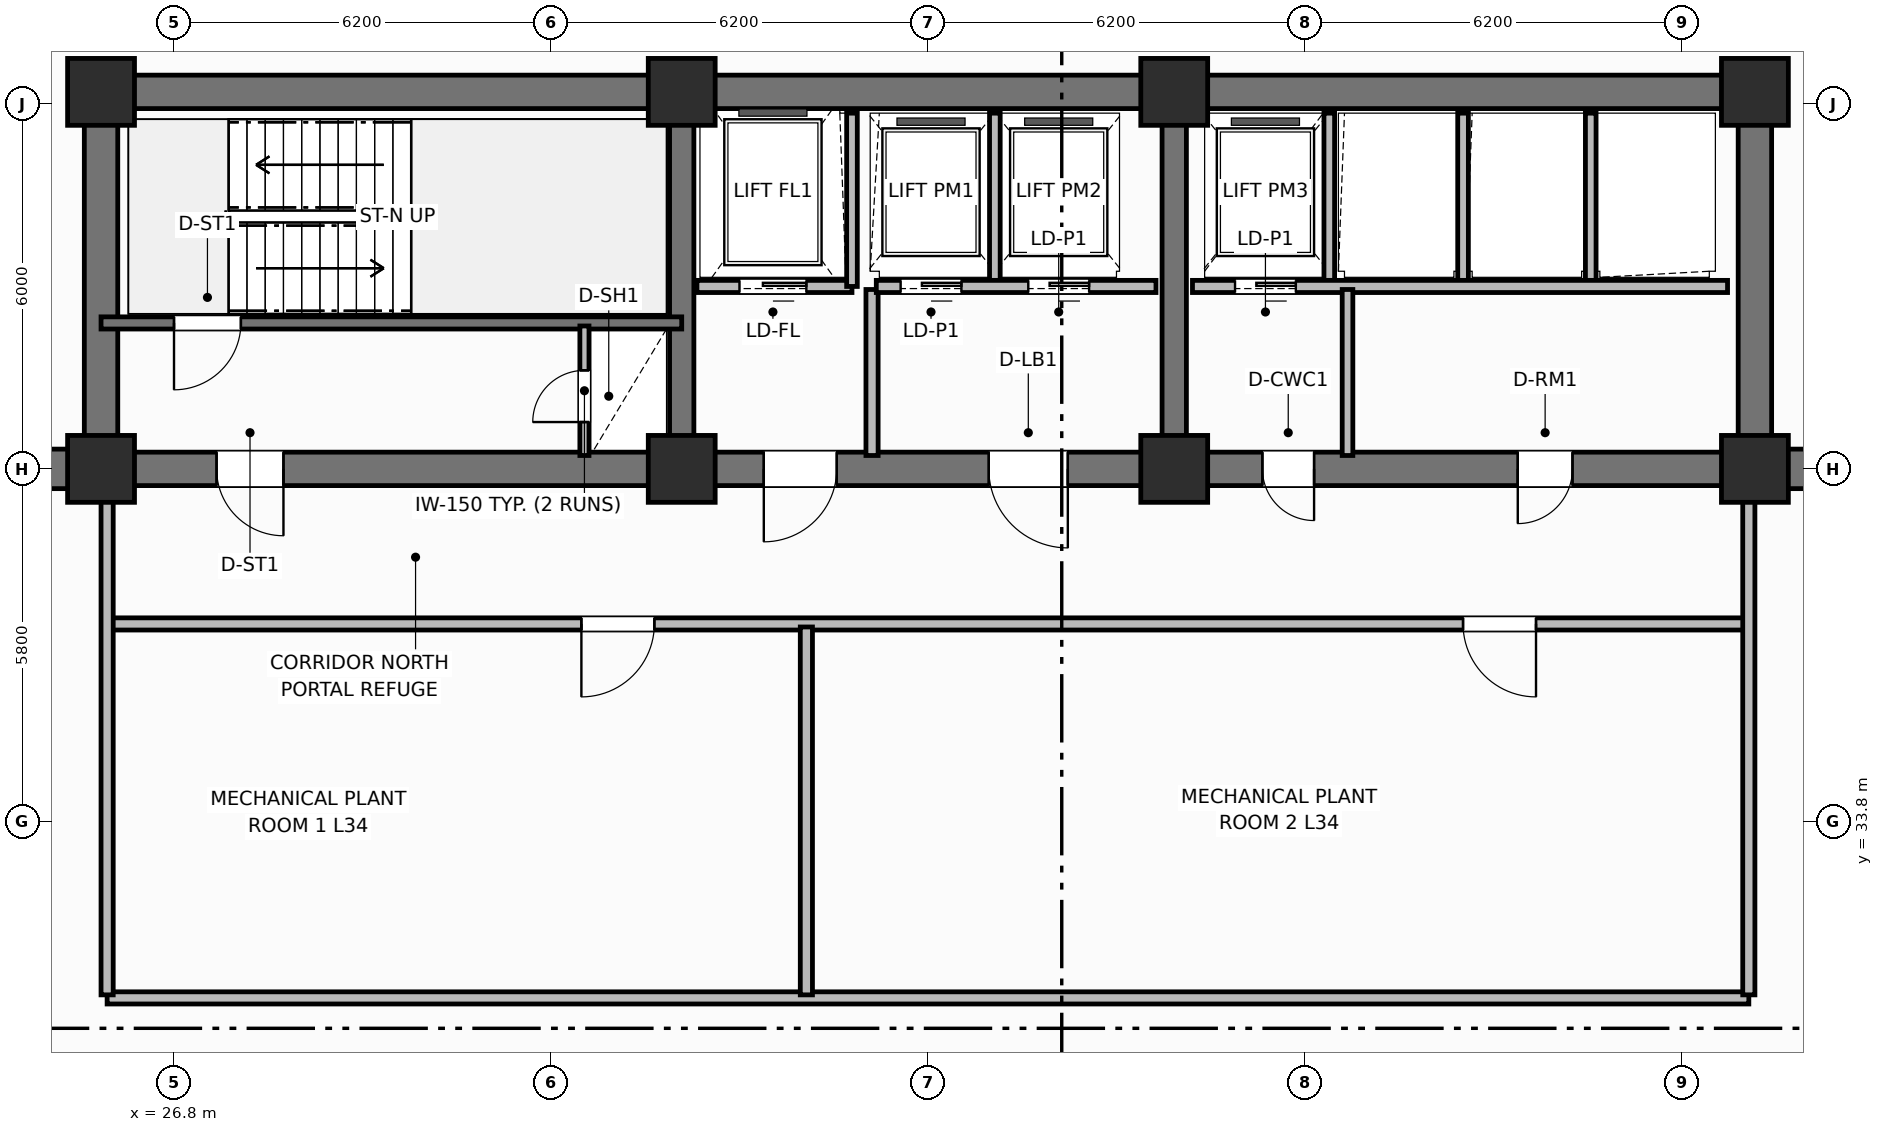
"""IFC4 building model, lengths in metres.
Left out: names, types, materials, properties, quantities, classifications, styles, units other than length and angle.
Written with IfcOpenShell. Run it as: python <this file> out.ifc"""

import sys

from ifc_helpers import new_model, si_unit, direction, frame, frame_2d, origin, origin_2d, place, context, subcontext, project, spatial, rectangle, extrude, element, fill, save


model = new_model("IFC4")
c1 = context("Model", 3, precision=1e-05, world=origin(), true_north=direction((0.0, 1.0)))
c2 = subcontext(c1, "Body", "Model", "MODEL_VIEW")
j1 = project(units=[si_unit("LENGTHUNIT", "METRE"), si_unit("PLANEANGLEUNIT", "RADIAN")], contexts=[c1])
p1 = place(None, origin())
s1 = spatial("IfcSite", under=j1, at=p1, CompositionType="ELEMENT")
p2 = place(p1, origin())
s2 = spatial("IfcBuilding", under=s1, at=p2, CompositionType="ELEMENT")
p3 = place(p2, frame((0.0, 0.0, 136.4)))
s3 = spatial("IfcBuildingStorey", under=s2, at=p3, CompositionType="ELEMENT", Elevation=136.4)
p4 = place(p3, frame((25.6, 45.8, 0.0), z_axis=(0.0, 0.0, 1.0), x_axis=(1.0, 0.0, 0.0)))
e1 = element("IfcWall", 1, at=p4, inside=s3, PredefinedType="SHEAR", context=c2, shape_type="SweptSolid", body=[
    extrude(rectangle(XDim=27.2, YDim=0.55, at=frame_2d((13.6, 0.0))), origin(), (0.0, 0.0, 1.0), 7.2),
])
for number, where, z_axis, x_axis in (
    (2, (25.6, 39.875, 0.0), (0.0, 0.0, 1.0), (0.0, 1.0, 0.0)),
    (3, (52.8, 39.875, 0.0), (0.0, 0.0, 1.0), (0.0, 1.0, 0.0)),
):
    element("IfcWall", number, at=place(p3, frame(where, z_axis=z_axis, x_axis=x_axis)), inside=s3, PredefinedType="SHEAR", context=c2, shape_type="SweptSolid", body=[
        extrude(rectangle(XDim=5.65, YDim=0.55, at=frame_2d((2.825, 0.0))), origin(), (0.0, 0.0, 1.0), 7.2),
    ])
p5 = place(p3, frame((52.8, 39.6, 0.0), z_axis=(0.0, 0.0, 1.0), x_axis=(-1.0, 0.0, 0.0)))
e4 = element("IfcWall", 4, at=p5, inside=s3, PredefinedType="SHEAR", context=c2, shape_type="SweptSolid", body=[
    extrude(rectangle(XDim=27.2, YDim=0.55, at=frame_2d((13.6, 0.0))), origin(), (0.0, 0.0, 1.0), 7.2),
])
p6 = place(p5, frame((24.2, 0.0, 0.0)))
e5 = element("IfcOpeningElement", 5, at=p6, cuts=e4, PredefinedType="OPENING", context=c2, shape_type="SweptSolid", body=[
    extrude(rectangle(XDim=1.1, YDim=2.15, at=frame_2d((0.55, 1.075))), frame((0.0, 0.285, 0.0), z_axis=(0.0, -1.0, 0.0), x_axis=(1.0, 0.0, 0.0)), (0.0, 0.0, 1.0), 0.57),
])
p7 = place(p5, frame((15.1, 0.0, 0.0)))
e6 = element("IfcOpeningElement", 6, at=p7, cuts=e4, PredefinedType="OPENING", context=c2, shape_type="SweptSolid", body=[
    extrude(rectangle(XDim=1.2, YDim=2.15, at=frame_2d((0.6, 1.075))), frame((0.0, 0.285, 0.0), z_axis=(0.0, -1.0, 0.0), x_axis=(1.0, 0.0, 0.0)), (0.0, 0.0, 1.0), 0.57),
])
p8 = place(p5, frame((11.3, 0.0, 0.0)))
e7 = element("IfcOpeningElement", 7, at=p8, cuts=e4, PredefinedType="OPENING", context=c2, shape_type="SweptSolid", body=[
    extrude(rectangle(XDim=1.3, YDim=2.2, at=frame_2d((0.65, 1.1))), frame((0.0, 0.285, 0.0), z_axis=(0.0, -1.0, 0.0), x_axis=(1.0, 0.0, 0.0)), (0.0, 0.0, 1.0), 0.57),
])
p9 = place(p5, frame((7.25, 0.0, 0.0)))
e8 = element("IfcOpeningElement", 8, at=p9, cuts=e4, PredefinedType="OPENING", context=c2, shape_type="SweptSolid", body=[
    extrude(rectangle(XDim=0.85, YDim=2.1, at=frame_2d((0.425, 1.05))), frame((0.0, 0.285, 0.0), z_axis=(0.0, -1.0, 0.0), x_axis=(1.0, 0.0, 0.0)), (0.0, 0.0, 1.0), 0.57),
])
p10 = place(p5, frame((3.0, 0.0, 0.0)))
e9 = element("IfcOpeningElement", 9, at=p10, cuts=e4, PredefinedType="OPENING", context=c2, shape_type="SweptSolid", body=[
    extrude(rectangle(XDim=0.9, YDim=2.1, at=frame_2d((0.45, 1.05))), frame((0.0, 0.285, 0.0), z_axis=(0.0, -1.0, 0.0), x_axis=(1.0, 0.0, 0.0)), (0.0, 0.0, 1.0), 0.57),
])
for number, where, z_axis, x_axis in (
    (10, (35.15, 39.875, 0.0), (0.0, 0.0, 1.0), (0.0, 1.0, 0.0)),
    (11, (43.25, 39.875, 0.0), (0.0, 0.0, 1.0), (0.0, 1.0, 0.0)),
):
    element("IfcWall", number, at=place(p3, frame(where, z_axis=z_axis, x_axis=x_axis)), inside=s3, PredefinedType="SHEAR", context=c2, shape_type="SweptSolid", body=[
        extrude(rectangle(XDim=5.65, YDim=0.4, at=frame_2d((2.825, 0.0))), origin(), (0.0, 0.0, 1.0), 7.2),
    ])
for number, where, z_axis, x_axis in (
    (12, (25.6, 39.6, 0.0), (0.0, 0.0, 1.0), (1.0, 0.0, 0.0)),
    (13, (25.6, 45.8, 0.0), (0.0, 0.0, 1.0), (1.0, 0.0, 0.0)),
    (14, (35.15, 39.6, 0.0), (0.0, 0.0, 1.0), (1.0, 0.0, 0.0)),
    (15, (35.15, 45.8, 0.0), (0.0, 0.0, 1.0), (1.0, 0.0, 0.0)),
    (16, (43.25, 39.6, 0.0), (0.0, 0.0, 1.0), (1.0, 0.0, 0.0)),
    (17, (43.25, 45.8, 0.0), (0.0, 0.0, 1.0), (1.0, 0.0, 0.0)),
    (18, (52.8, 39.6, 0.0), (0.0, 0.0, 1.0), (1.0, 0.0, 0.0)),
    (19, (52.8, 45.8, 0.0), (0.0, 0.0, 1.0), (1.0, 0.0, 0.0)),
):
    element("IfcColumn", number, at=place(p3, frame(where, z_axis=z_axis, x_axis=x_axis)), inside=s3, PredefinedType="COLUMN", context=c2, shape_type="SweptSolid", body=[
        extrude(rectangle(XDim=1.1, YDim=1.1, at=origin_2d()), origin(), (0.0, 0.0, 1.0), 7.2),
    ])
for number, where, z_axis, x_axis in (
    (20, (15.05, 39.6, 0.0), (0.0, 0.0, 1.0), (1.0, 0.0, 0.0)),
    (21, (52.8, 39.6, 0.0), (0.0, 0.0, 1.0), (1.0, 0.0, 0.0)),
):
    element("IfcWall", number, at=place(p3, frame(where, z_axis=z_axis, x_axis=x_axis)), inside=s3, PredefinedType="SHEAR", context=c2, shape_type="SweptSolid", body=[
        extrude(rectangle(XDim=10.55, YDim=0.65, at=frame_2d((5.275, 0.0))), origin(), (0.0, 0.0, 1.0), 6.8),
    ])
p11 = place(p3, frame((35.15, 42.0, 0.0), z_axis=(0.0, 0.0, 1.0), x_axis=(-1.0, 0.0, 0.0)))
e22 = element("IfcWall", 22, at=p11, inside=s3, PredefinedType="SHEAR", context=c2, shape_type="SweptSolid", body=[
    extrude(rectangle(XDim=9.55, YDim=0.2, at=frame_2d((4.775, 0.0))), origin(), (0.0, 0.0, 1.0), 7.2),
])
p12 = place(p11, frame((7.25, 0.0, 0.0)))
e23 = element("IfcOpeningElement", 23, at=p12, cuts=e22, PredefinedType="OPENING", context=c2, shape_type="SweptSolid", body=[
    extrude(rectangle(XDim=1.1, YDim=2.15, at=frame_2d((0.55, 1.075))), frame((0.0, 0.11, 0.0), z_axis=(0.0, -1.0, 0.0), x_axis=(1.0, 0.0, 0.0)), (0.0, 0.0, 1.0), 0.22),
])
p13 = place(p3, frame((33.55, 39.82, 0.0), z_axis=(0.0, 0.0, 1.0), x_axis=(0.0, 1.0, 0.0)))
e24 = element("IfcWall", 24, at=p13, inside=s3, PredefinedType="PARTITIONING", context=c2, shape_type="SweptSolid", body=[
    extrude(rectangle(XDim=2.13, YDim=0.15, at=frame_2d((1.065, 0.0))), origin(), (0.0, 0.0, 1.0), 4.96),
])
p14 = place(p13, frame((0.55, 0.0, 0.0)))
e25 = element("IfcOpeningElement", 25, at=p14, cuts=e24, PredefinedType="OPENING", context=c2, shape_type="SweptSolid", body=[
    extrude(rectangle(XDim=0.85, YDim=2.05, at=frame_2d((0.425, 1.025))), frame((0.0, 0.085, 0.0), z_axis=(0.0, -1.0, 0.0), x_axis=(1.0, 0.0, 0.0)), (0.0, 0.0, 1.0), 0.17),
])
p15 = place(p3, frame((37.95, 42.6, 0.0), z_axis=(0.0, 0.0, 1.0), x_axis=(-1.0, 0.0, 0.0)))
e26 = element("IfcWall", 26, at=p15, inside=s3, PredefinedType="PARTITIONING", context=c2, shape_type="SweptSolid", body=[
    extrude(rectangle(XDim=2.55, YDim=0.2, at=frame_2d((1.275, 0.0))), origin(), (0.0, 0.0, 1.0), 4.96),
])
p16 = place(p15, frame((0.75, 0.0, 0.0)))
e27 = element("IfcOpeningElement", 27, at=p16, cuts=e26, PredefinedType="OPENING", context=c2, shape_type="SweptSolid", body=[
    extrude(rectangle(XDim=1.1, YDim=2.15, at=frame_2d((0.55, 1.075))), frame((0.0, 0.11, 0.0), z_axis=(0.0, -1.0, 0.0), x_axis=(1.0, 0.0, 0.0)), (0.0, 0.0, 1.0), 0.22),
])
p17 = place(p3, frame((37.95, 42.6, 0.0), z_axis=(0.0, 0.0, 1.0), x_axis=(0.0, 1.0, 0.0)))
e28 = element("IfcWall", 28, at=p17, inside=s3, PredefinedType="PARTITIONING", context=c2, shape_type="SweptSolid", body=[
    extrude(rectangle(XDim=2.85, YDim=0.175, at=frame_2d((1.425, 0.0))), origin(), (0.0, 0.0, 1.0), 4.96),
])
p18 = place(p3, frame((38.28, 39.82, 0.0), z_axis=(0.0, 0.0, 1.0), x_axis=(0.0, 1.0, 0.0)))
e29 = element("IfcWall", 29, at=p18, inside=s3, PredefinedType="PARTITIONING", context=c2, shape_type="SweptSolid", body=[
    extrude(rectangle(XDim=2.73, YDim=0.2, at=frame_2d((1.365, 0.0))), origin(), (0.0, 0.0, 1.0), 4.96),
])
p19 = place(p3, frame((40.3, 42.65, 0.0), z_axis=(0.0, 0.0, 1.0), x_axis=(0.0, 1.0, 0.0)))
e30 = element("IfcWall", 30, at=p19, inside=s3, PredefinedType="PARTITIONING", context=c2, shape_type="SweptSolid", body=[
    extrude(rectangle(XDim=2.8, YDim=0.175, at=frame_2d((1.4, 0.0))), origin(), (0.0, 0.0, 1.0), 4.96),
])
p20 = place(p3, frame((42.95, 42.6, 0.0), z_axis=(0.0, 0.0, 1.0), x_axis=(-1.0, 0.0, 0.0)))
e31 = element("IfcWall", 31, at=p20, inside=s3, PredefinedType="PARTITIONING", context=c2, shape_type="SweptSolid", body=[
    extrude(rectangle(XDim=4.6, YDim=0.2, at=frame_2d((2.3, 0.0))), origin(), (0.0, 0.0, 1.0), 4.96),
])
p21 = place(p20, frame((3.2, 0.0, 0.0)))
e32 = element("IfcOpeningElement", 32, at=p21, cuts=e31, PredefinedType="OPENING", context=c2, shape_type="SweptSolid", body=[
    extrude(rectangle(XDim=1.0, YDim=2.15, at=frame_2d((0.5, 1.075))), frame((0.0, 0.11, 0.0), z_axis=(0.0, -1.0, 0.0), x_axis=(1.0, 0.0, 0.0)), (0.0, 0.0, 1.0), 0.22),
])
p22 = place(p20, frame((1.1, 0.0, 0.0)))
e33 = element("IfcOpeningElement", 33, at=p22, cuts=e31, PredefinedType="OPENING", context=c2, shape_type="SweptSolid", body=[
    extrude(rectangle(XDim=1.0, YDim=2.15, at=frame_2d((0.5, 1.075))), frame((0.0, 0.11, 0.0), z_axis=(0.0, -1.0, 0.0), x_axis=(1.0, 0.0, 0.0)), (0.0, 0.0, 1.0), 0.22),
])
for number, where, z_axis, x_axis in (
    (34, (45.8, 42.65, 0.0), (0.0, 0.0, 1.0), (0.0, 1.0, 0.0)),
    (35, (48.0, 42.65, 0.0), (0.0, 0.0, 1.0), (0.0, 1.0, 0.0)),
    (36, (50.1, 42.65, 0.0), (0.0, 0.0, 1.0), (0.0, 1.0, 0.0)),
):
    element("IfcWall", number, at=place(p3, frame(where, z_axis=z_axis, x_axis=x_axis)), inside=s3, PredefinedType="PARTITIONING", context=c2, shape_type="SweptSolid", body=[
        extrude(rectangle(XDim=2.8, YDim=0.175, at=frame_2d((1.4, 0.0))), origin(), (0.0, 0.0, 1.0), 4.96),
    ])
p23 = place(p3, frame((52.35, 42.6, 0.0), z_axis=(0.0, 0.0, 1.0), x_axis=(-1.0, 0.0, 0.0)))
e37 = element("IfcWall", 37, at=p23, inside=s3, PredefinedType="PARTITIONING", context=c2, shape_type="SweptSolid", body=[
    extrude(rectangle(XDim=8.8, YDim=0.2, at=frame_2d((4.4, 0.0))), origin(), (0.0, 0.0, 1.0), 4.96),
])
p24 = place(p23, frame((7.1, 0.0, 0.0)))
e38 = element("IfcOpeningElement", 38, at=p24, cuts=e37, PredefinedType="OPENING", context=c2, shape_type="SweptSolid", body=[
    extrude(rectangle(XDim=1.0, YDim=2.15, at=frame_2d((0.5, 1.075))), frame((0.0, 0.11, 0.0), z_axis=(0.0, -1.0, 0.0), x_axis=(1.0, 0.0, 0.0)), (0.0, 0.0, 1.0), 0.22),
])
p25 = place(p3, frame((46.1, 39.82, 0.0), z_axis=(0.0, 0.0, 1.0), x_axis=(0.0, 1.0, 0.0)))
e39 = element("IfcWall", 39, at=p25, inside=s3, PredefinedType="PARTITIONING", context=c2, shape_type="SweptSolid", body=[
    extrude(rectangle(XDim=2.73, YDim=0.175, at=frame_2d((1.365, 0.0))), origin(), (0.0, 0.0, 1.0), 4.96),
])
p26 = place(p3, frame((52.7, 37.05, 0.0), z_axis=(0.0, 0.0, 1.0), x_axis=(-1.0, 0.0, 0.0)))
e40 = element("IfcWall", 40, at=p26, inside=s3, PredefinedType="PARTITIONING", context=c2, shape_type="SweptSolid", body=[
    extrude(rectangle(XDim=27.0, YDim=0.2, at=frame_2d((13.5, 0.0))), origin(), (0.0, 0.0, 1.0), 4.96),
])
p27 = place(p26, frame((3.5, 0.0, 0.0)))
e41 = element("IfcOpeningElement", 41, at=p27, cuts=e40, PredefinedType="OPENING", context=c2, shape_type="SweptSolid", body=[
    extrude(rectangle(XDim=1.2, YDim=2.15, at=frame_2d((0.6, 1.075))), frame((0.0, 0.11, 0.0), z_axis=(0.0, -1.0, 0.0), x_axis=(1.0, 0.0, 0.0)), (0.0, 0.0, 1.0), 0.22),
])
p28 = place(p26, frame((18.0, 0.0, 0.0)))
e42 = element("IfcOpeningElement", 42, at=p28, cuts=e40, PredefinedType="OPENING", context=c2, shape_type="SweptSolid", body=[
    extrude(rectangle(XDim=1.2, YDim=2.15, at=frame_2d((0.6, 1.075))), frame((0.0, 0.11, 0.0), z_axis=(0.0, -1.0, 0.0), x_axis=(1.0, 0.0, 0.0)), (0.0, 0.0, 1.0), 0.22),
])
p29 = place(p3, frame((25.7, 30.9, 0.0), z_axis=(0.0, 0.0, 1.0), x_axis=(1.0, 0.0, 0.0)))
e43 = element("IfcWall", 43, at=p29, inside=s3, PredefinedType="PARTITIONING", context=c2, shape_type="SweptSolid", body=[
    extrude(rectangle(XDim=27.0, YDim=0.2, at=frame_2d((13.5, 0.0))), origin(), (0.0, 0.0, 1.0), 4.96),
])
p30 = place(p3, frame((37.2, 30.95, 0.0), z_axis=(0.0, 0.0, 1.0), x_axis=(0.0, 1.0, 0.0)))
e44 = element("IfcWall", 44, at=p30, inside=s3, PredefinedType="PARTITIONING", context=c2, shape_type="SweptSolid", body=[
    extrude(rectangle(XDim=6.05, YDim=0.2, at=frame_2d((3.025, 0.0))), origin(), (0.0, 0.0, 1.0), 4.96),
])
for number, where, z_axis, x_axis in (
    (45, (25.7, 30.95, 0.0), (0.0, 0.0, 1.0), (0.0, 1.0, 0.0)),
    (46, (52.7, 30.95, 0.0), (0.0, 0.0, 1.0), (0.0, 1.0, 0.0)),
):
    element("IfcWall", number, at=place(p3, frame(where, z_axis=z_axis, x_axis=x_axis)), inside=s3, PredefinedType="PARTITIONING", context=c2, shape_type="SweptSolid", body=[
        extrude(rectangle(XDim=8.25, YDim=0.2, at=frame_2d((4.125, 0.0))), origin(), (0.0, 0.0, 1.0), 4.96),
    ])
p31 = place(p12, origin())
e47 = element("IfcDoor", 47, at=p31, inside=s3, OperationType="SINGLE_SWING_RIGHT", PredefinedType="DOOR", context=c2, shape_type="SweptSolid", body=[
    extrude(rectangle(XDim=1.1, YDim=2.15, at=frame_2d((0.55, 1.075))), frame((0.0, 0.025, 0.0), z_axis=(0.0, -1.0, 0.0), x_axis=(1.0, 0.0, 0.0)), (0.0, 0.0, 1.0), 0.05),
])
fill(e23, e47)
p32 = place(p14, origin())
e48 = element("IfcDoor", 48, at=p32, inside=s3, OperationType="SINGLE_SWING_LEFT", PredefinedType="TRAPDOOR", context=c2, shape_type="SweptSolid", body=[
    extrude(rectangle(XDim=0.85, YDim=2.05, at=frame_2d((0.425, 1.025))), frame((0.0, 0.025, 0.0), z_axis=(0.0, -1.0, 0.0), x_axis=(1.0, 0.0, 0.0)), (0.0, 0.0, 1.0), 0.05),
])
fill(e25, e48)
p33 = place(p16, origin())
e49 = element("IfcDoor", 49, at=p33, inside=s3, OperationType="SLIDING_TO_LEFT", PredefinedType="DOOR", context=c2, shape_type="SweptSolid", body=[
    extrude(rectangle(XDim=1.1, YDim=2.15, at=frame_2d((0.55, 1.075))), frame((0.0, 0.025, 0.0), z_axis=(0.0, -1.0, 0.0), x_axis=(1.0, 0.0, 0.0)), (0.0, 0.0, 1.0), 0.05),
])
fill(e27, e49)
p34 = place(p21, origin())
e50 = element("IfcDoor", 50, at=p34, inside=s3, OperationType="SLIDING_TO_LEFT", PredefinedType="DOOR", context=c2, shape_type="SweptSolid", body=[
    extrude(rectangle(XDim=1.0, YDim=2.15, at=frame_2d((0.5, 1.075))), frame((0.0, 0.025, 0.0), z_axis=(0.0, -1.0, 0.0), x_axis=(1.0, 0.0, 0.0)), (0.0, 0.0, 1.0), 0.05),
])
fill(e32, e50)
p35 = place(p22, origin())
e51 = element("IfcDoor", 51, at=p35, inside=s3, OperationType="SLIDING_TO_LEFT", PredefinedType="DOOR", context=c2, shape_type="SweptSolid", body=[
    extrude(rectangle(XDim=1.0, YDim=2.15, at=frame_2d((0.5, 1.075))), frame((0.0, 0.025, 0.0), z_axis=(0.0, -1.0, 0.0), x_axis=(1.0, 0.0, 0.0)), (0.0, 0.0, 1.0), 0.05),
])
fill(e33, e51)
p36 = place(p24, origin())
e52 = element("IfcDoor", 52, at=p36, inside=s3, OperationType="SLIDING_TO_LEFT", PredefinedType="DOOR", context=c2, shape_type="SweptSolid", body=[
    extrude(rectangle(XDim=1.0, YDim=2.15, at=frame_2d((0.5, 1.075))), frame((0.0, 0.025, 0.0), z_axis=(0.0, -1.0, 0.0), x_axis=(1.0, 0.0, 0.0)), (0.0, 0.0, 1.0), 0.05),
])
fill(e38, e52)
p37 = place(p27, origin())
e53 = element("IfcDoor", 53, at=p37, inside=s3, OperationType="SINGLE_SWING_LEFT", PredefinedType="DOOR", context=c2, shape_type="SweptSolid", body=[
    extrude(rectangle(XDim=1.2, YDim=2.15, at=frame_2d((0.6, 1.075))), frame((0.0, 0.025, 0.0), z_axis=(0.0, -1.0, 0.0), x_axis=(1.0, 0.0, 0.0)), (0.0, 0.0, 1.0), 0.05),
])
fill(e41, e53)
p38 = place(p28, origin())
e54 = element("IfcDoor", 54, at=p38, inside=s3, OperationType="SINGLE_SWING_RIGHT", PredefinedType="DOOR", context=c2, shape_type="SweptSolid", body=[
    extrude(rectangle(XDim=1.2, YDim=2.15, at=frame_2d((0.6, 1.075))), frame((0.0, 0.025, 0.0), z_axis=(0.0, -1.0, 0.0), x_axis=(1.0, 0.0, 0.0)), (0.0, 0.0, 1.0), 0.05),
])
fill(e42, e54)
p39 = place(p6, origin())
e55 = element("IfcDoor", 55, at=p39, inside=s3, OperationType="SINGLE_SWING_LEFT", PredefinedType="DOOR", context=c2, shape_type="SweptSolid", body=[
    extrude(rectangle(XDim=1.1, YDim=2.15, at=frame_2d((0.55, 1.075))), frame((0.0, 0.025, 0.0), z_axis=(0.0, -1.0, 0.0), x_axis=(1.0, 0.0, 0.0)), (0.0, 0.0, 1.0), 0.05),
])
fill(e5, e55)
p40 = place(p7, origin())
e56 = element("IfcDoor", 56, at=p40, inside=s3, OperationType="SINGLE_SWING_RIGHT", PredefinedType="DOOR", context=c2, shape_type="SweptSolid", body=[
    extrude(rectangle(XDim=1.2, YDim=2.15, at=frame_2d((0.6, 1.075))), frame((0.0, 0.025, 0.0), z_axis=(0.0, -1.0, 0.0), x_axis=(1.0, 0.0, 0.0)), (0.0, 0.0, 1.0), 0.05),
])
fill(e6, e56)
p41 = place(p8, origin())
e57 = element("IfcDoor", 57, at=p41, inside=s3, OperationType="SINGLE_SWING_LEFT", PredefinedType="DOOR", context=c2, shape_type="SweptSolid", body=[
    extrude(rectangle(XDim=1.3, YDim=2.2, at=frame_2d((0.65, 1.1))), frame((0.0, 0.025, 0.0), z_axis=(0.0, -1.0, 0.0), x_axis=(1.0, 0.0, 0.0)), (0.0, 0.0, 1.0), 0.05),
])
fill(e7, e57)
p42 = place(p9, origin())
e58 = element("IfcDoor", 58, at=p42, inside=s3, OperationType="SINGLE_SWING_LEFT", PredefinedType="DOOR", context=c2, shape_type="SweptSolid", body=[
    extrude(rectangle(XDim=0.85, YDim=2.1, at=frame_2d((0.425, 1.05))), frame((0.0, 0.025, 0.0), z_axis=(0.0, -1.0, 0.0), x_axis=(1.0, 0.0, 0.0)), (0.0, 0.0, 1.0), 0.05),
])
fill(e8, e58)
p43 = place(p10, origin())
e59 = element("IfcDoor", 59, at=p43, inside=s3, OperationType="SINGLE_SWING_RIGHT", PredefinedType="DOOR", context=c2, shape_type="SweptSolid", body=[
    extrude(rectangle(XDim=0.9, YDim=2.1, at=frame_2d((0.45, 1.05))), frame((0.0, 0.025, 0.0), z_axis=(0.0, -1.0, 0.0), x_axis=(1.0, 0.0, 0.0)), (0.0, 0.0, 1.0), 0.05),
])
fill(e9, e59)
save(model, sys.argv[1])
